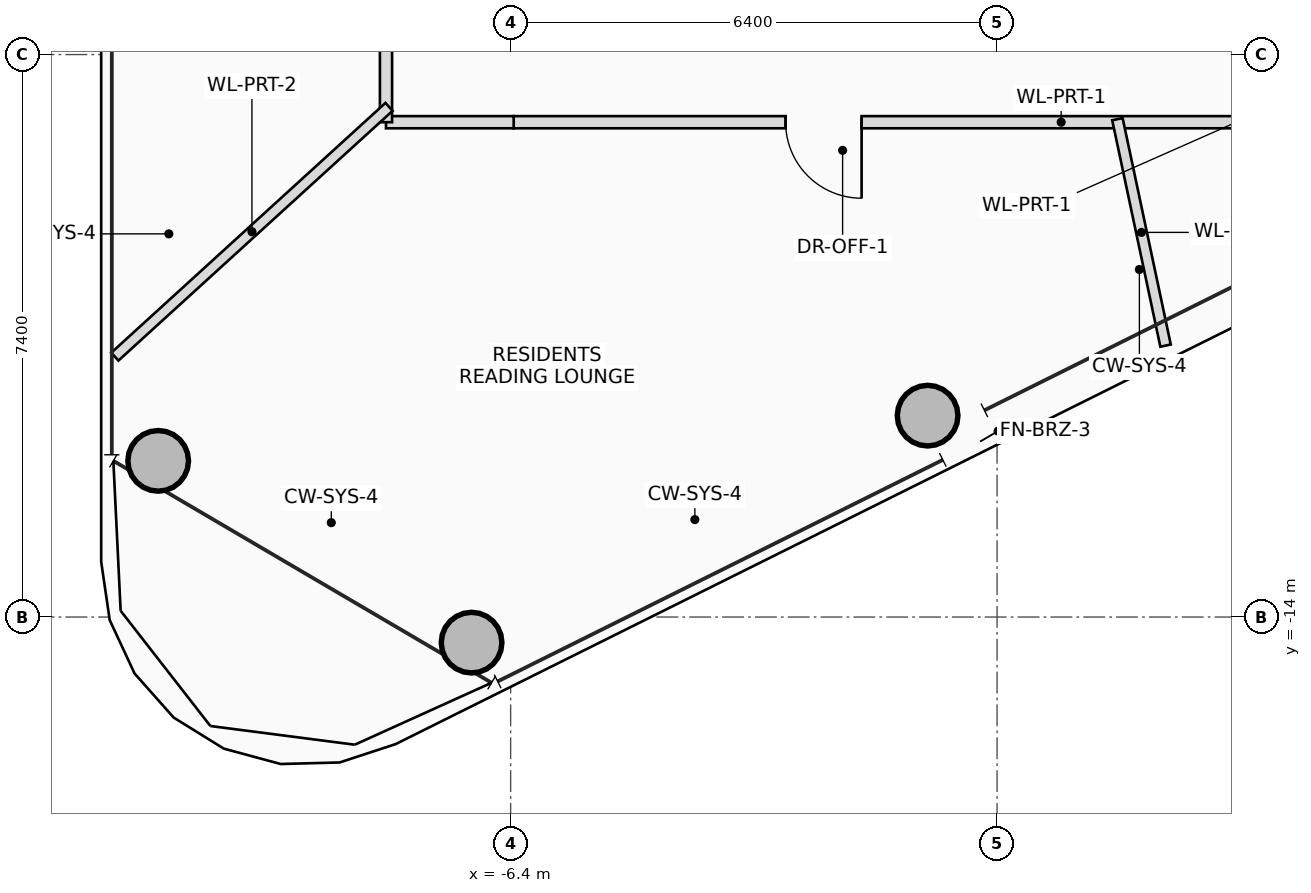
"""IFC4 building model, lengths in metres.
Left out: names, types, materials, properties, quantities, classifications, styles, units other than length and angle.
Written with IfcOpenShell. Run it as: python <this file> out.ifc"""

import sys

from ifc_helpers import new_model, si_unit, direction, frame, frame_2d, origin, origin_2d, place, context, subcontext, project, spatial, rectangle, hollow_circle, extrude, source, transform, mapped, element, fill, save


model = new_model("IFC4")
c1 = context("Model", 3, precision=1e-05, world=origin(), true_north=direction((0.0, 1.0)))
c2 = subcontext(c1, "Body", "Model", "MODEL_VIEW")
j1 = project(units=[si_unit("LENGTHUNIT", "METRE"), si_unit("PLANEANGLEUNIT", "RADIAN")], contexts=[c1])
p1 = place(None, origin())
s1 = spatial("IfcSite", under=j1, at=p1, CompositionType="ELEMENT")
p2 = place(p1, origin())
s2 = spatial("IfcBuilding", under=s1, at=p2, CompositionType="ELEMENT")
p3 = place(p2, frame((0.0, 0.0, 296.75)))
s3 = spatial("IfcBuildingStorey", under=s2, at=p3, CompositionType="ELEMENT", Elevation=296.75)
m1 = source(origin(), c2, "Body", "SweptSolid", [
    extrude(hollow_circle(Radius=0.4, WallThickness=0.028, at=origin_2d()), origin(), (0.0, 0.0, 1.0), 3.45),
])
for number, where, z_axis, x_axis in (
    (1, (-6.914, -14.337, 0.0), (0.0, 0.0, 1.0), (1.0, 0.0, 0.0)),
    (2, (-0.914, -11.35, 0.0), (0.0, 0.0, 1.0), (1.0, 0.0, 0.0)),
    (3, (-11.037, -11.945, 0.0), (0.0, 0.0, 1.0), (1.0, 0.0, 0.0)),
):
    element("IfcColumn", number, at=place(p3, frame(where, z_axis=z_axis, x_axis=x_axis)), inside=s3, PredefinedType="COLUMN", context=c2, shape_type="MappedRepresentation", body=[
        mapped(m1, transform((0.0, 0.0, 0.0), scale=1.0)),
    ])
p4 = place(p3, frame((3.319, -7.49, 0.0), z_axis=(0.0, 0.0, 1.0), x_axis=(-1.0, 0.0, 0.0)))
e4 = element("IfcWall", 4, at=p4, inside=s3, PredefinedType="PARTITIONING", context=c2, shape_type="SweptSolid", body=[
    extrude(rectangle(XDim=9.679, YDim=0.16, at=frame_2d((4.84, 0.0))), origin(), (0.0, 0.0, 1.0), 2.655),
])
p5 = place(p4, frame((5.101, 0.0, 0.0)))
e5 = element("IfcOpeningElement", 5, at=p5, cuts=e4, PredefinedType="OPENING", context=c2, shape_type="SweptSolid", body=[
    extrude(rectangle(XDim=1.0, YDim=2.25, at=frame_2d((0.5, 1.125))), frame((0.0, 0.09, 0.0), z_axis=(0.0, -1.0, 0.0), x_axis=(1.0, 0.0, 0.0)), (0.0, 0.0, 1.0), 0.18),
])
p6 = place(p3, frame((-6.36, -7.49, 0.0), z_axis=(0.0, 0.0, 1.0), x_axis=(-1.0, 0.0, 0.0)))
e6 = element("IfcWall", 6, at=p6, inside=s3, PredefinedType="PARTITIONING", context=c2, shape_type="SweptSolid", body=[
    extrude(rectangle(XDim=1.68, YDim=0.16, at=frame_2d((0.84, 0.0))), origin(), (0.0, 0.0, 1.0), 2.655),
])
p7 = place(p3, frame((-8.04, -7.49, 0.0), z_axis=(0.0, 0.0, 1.0), x_axis=(0.0, 1.0, 0.0)))
e7 = element("IfcWall", 7, at=p7, inside=s3, PredefinedType="PARTITIONING", context=c2, shape_type="SweptSolid", body=[
    extrude(rectangle(XDim=1.64, YDim=0.16, at=frame_2d((0.82, 0.0))), origin(), (0.0, 0.0, 1.0), 3.25),
])
p8 = place(p3, frame((-8.0, -7.288, 0.0), z_axis=(0.0, 0.0, 1.0), x_axis=(-0.739260540131, -0.673419522886, 0.0)))
e8 = element("IfcWall", 8, at=p8, inside=s3, PredefinedType="PARTITIONING", context=c2, shape_type="SweptSolid", body=[
    extrude(rectangle(XDim=4.88, YDim=0.14, at=frame_2d((2.44, 0.0))), origin(), (0.0, 0.0, 1.0), 2.815),
])
p9 = place(p3, frame((1.583, -7.45, 0.0), z_axis=(0.0, 0.0, 1.0), x_axis=(0.207941206443, -0.978141326529, 0.0)))
e9 = element("IfcWall", 9, at=p9, inside=s3, PredefinedType="PARTITIONING", context=c2, shape_type="SweptSolid", body=[
    extrude(rectangle(XDim=3.046, YDim=0.14, at=frame_2d((1.523, 0.0))), origin(), (0.0, 0.0, 1.0), 2.815),
])
p10 = place(p5, origin())
e10 = element("IfcDoor", 10, at=p10, inside=s3, OperationType="SINGLE_SWING_LEFT", PredefinedType="DOOR", context=c2, shape_type="SweptSolid", body=[
    extrude(rectangle(XDim=1.0, YDim=2.25, at=frame_2d((0.5, 1.125))), frame((0.0, 0.025, 0.0), z_axis=(0.0, -1.0, 0.0), x_axis=(1.0, 0.0, 0.0)), (0.0, 0.0, 1.0), 0.05),
])
fill(e5, e10)
save(model, sys.argv[1])
